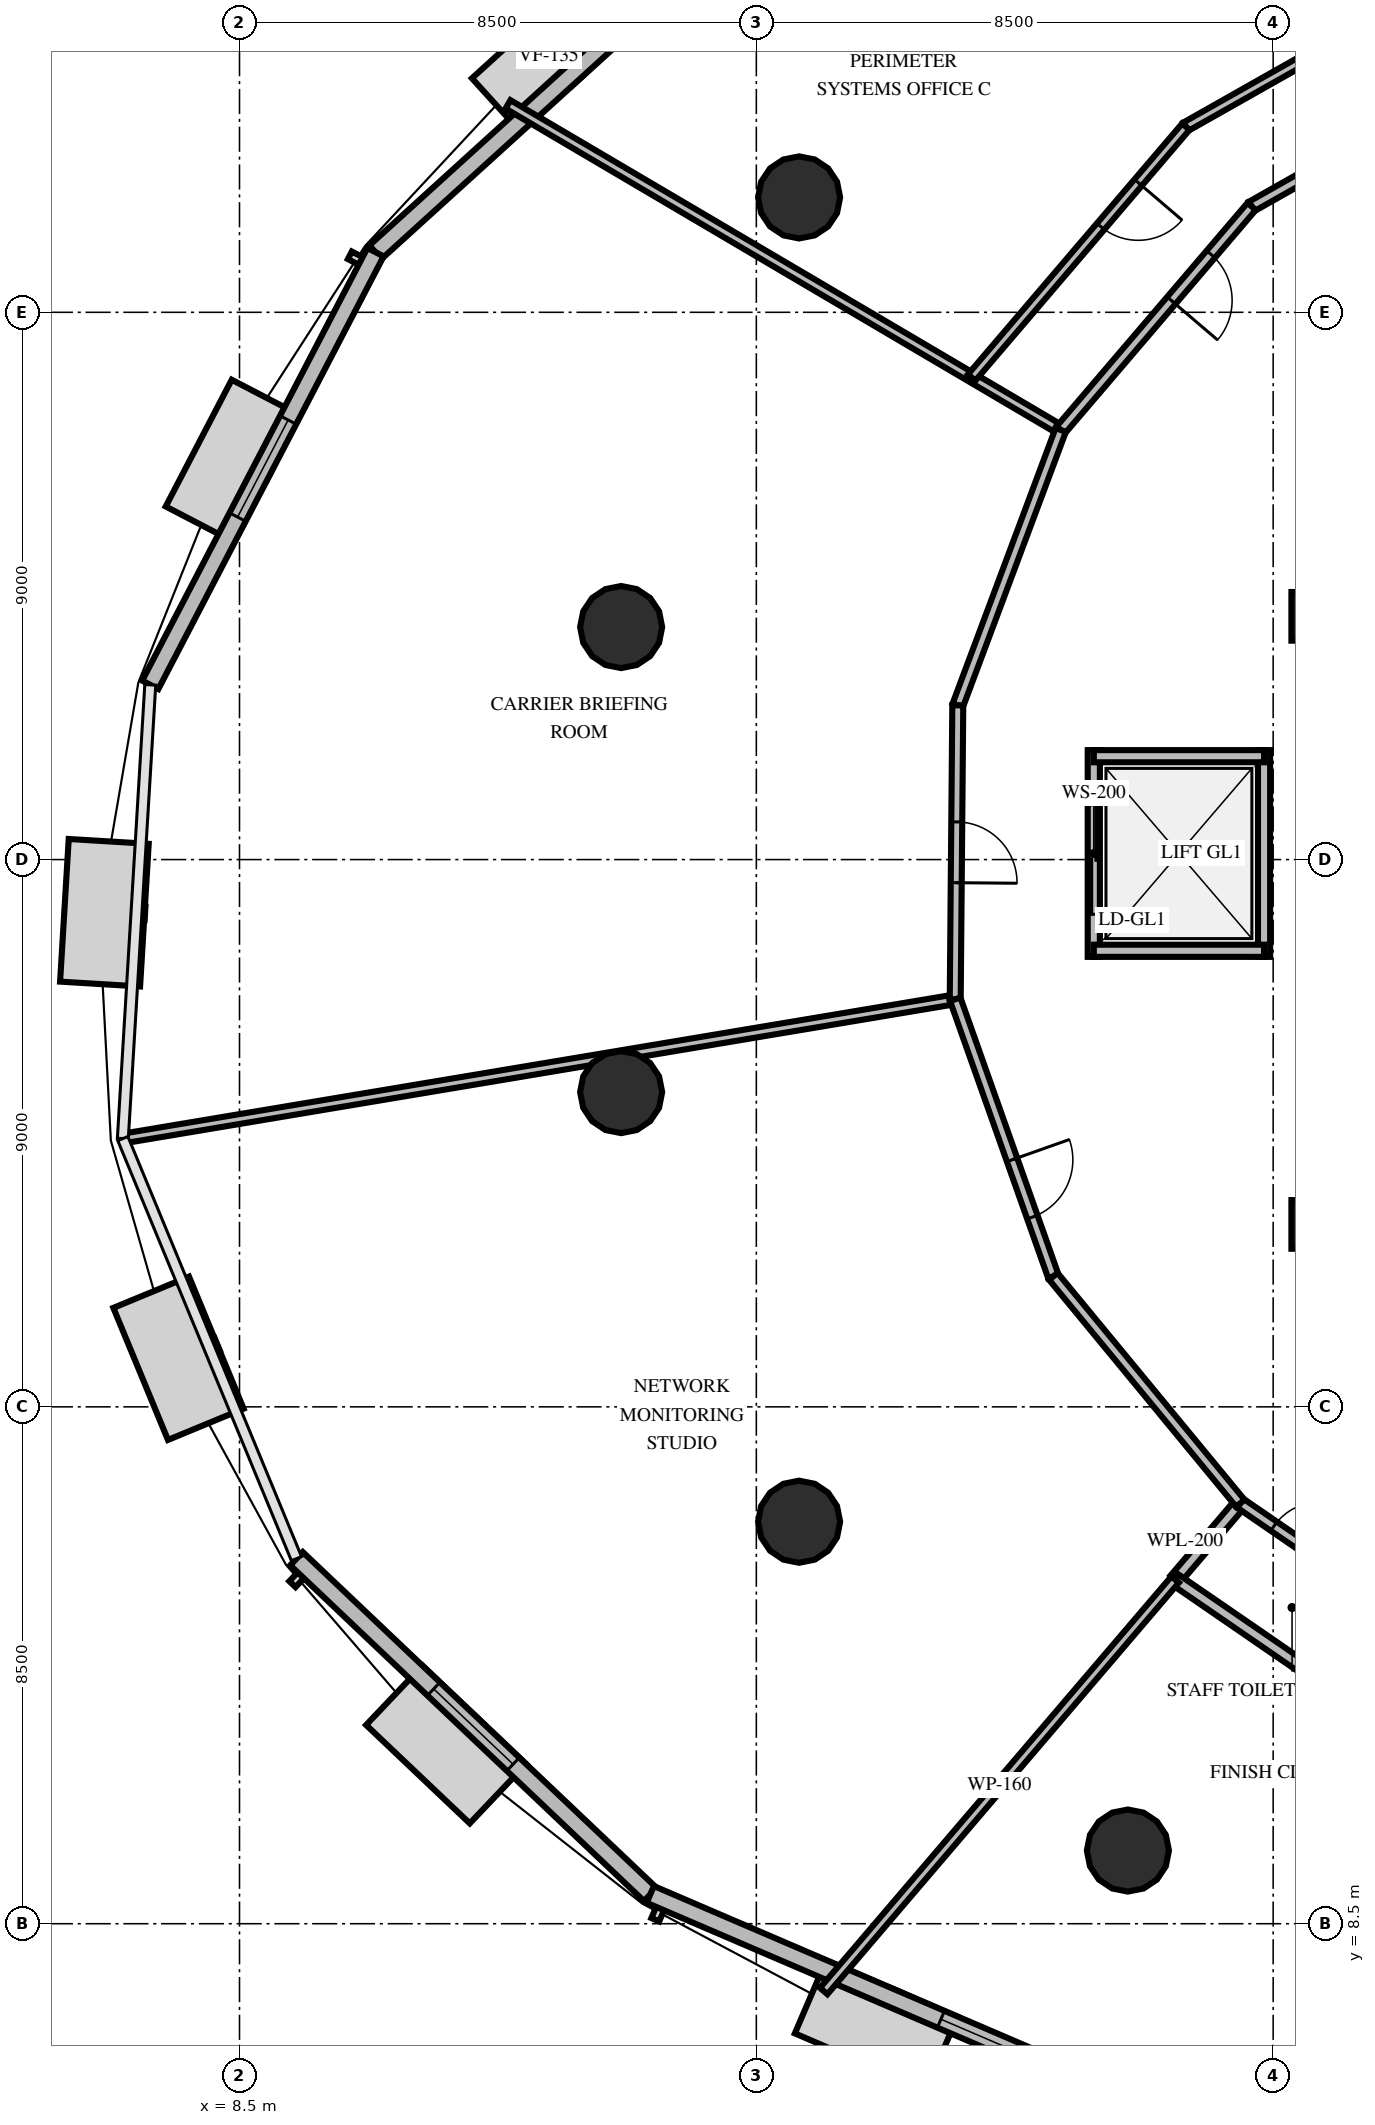
"""IFC4 building model, lengths in metres.
Left out: names, types, materials, properties, quantities, classifications, styles, units other than length and angle.
Written with IfcOpenShell. Run it as: python <this file> out.ifc"""

import sys

from ifc_helpers import new_model, si_unit, direction, frame, frame_2d, origin, origin_2d, place, context, subcontext, project, spatial, rectangle, circle, extrude, element, fill, save


model = new_model("IFC4")
c1 = context("Model", 3, precision=1e-05, world=origin(), true_north=direction((0.0, 1.0)))
c2 = subcontext(c1, "Body", "Model", "MODEL_VIEW")
j1 = project(units=[si_unit("LENGTHUNIT", "METRE"), si_unit("PLANEANGLEUNIT", "RADIAN")], contexts=[c1])
p1 = place(None, origin())
s1 = spatial("IfcSite", under=j1, at=p1, CompositionType="ELEMENT")
p2 = place(p1, origin())
s2 = spatial("IfcBuilding", under=s1, at=p2, CompositionType="ELEMENT")
p3 = place(p2, frame((0.0, 0.0, 72.0)))
s3 = spatial("IfcBuildingStorey", under=s2, at=p3, CompositionType="ELEMENT", Elevation=72.0)
for number, where, z_axis, x_axis in (
    (1, (26.2, 20.0, 0.0), (0.0, 0.0, 1.0), (1.0, 0.0, 0.0)),
    (2, (26.2, 30.0, 0.0), (0.0, 0.0, 1.0), (1.0, 0.0, 0.0)),
):
    element("IfcColumn", number, at=place(p3, frame(where, z_axis=z_axis, x_axis=x_axis)), inside=s3, PredefinedType="PILASTER", context=c2, shape_type="SweptSolid", body=[
        extrude(rectangle(XDim=0.8, YDim=0.8, at=origin_2d()), origin(), (0.0, 0.0, 1.0), 4.2),
    ])
for number, where, z_axis, x_axis in (
    (3, (17.703, 36.889, 0.0), (0.0, 0.0, 1.0), (1.0, 0.0, 0.0)),
    (4, (14.777, 29.824, 0.0), (0.0, 0.0, 1.0), (1.0, 0.0, 0.0)),
    (5, (14.777, 22.176, 0.0), (0.0, 0.0, 1.0), (1.0, 0.0, 0.0)),
    (6, (17.703, 15.111, 0.0), (0.0, 0.0, 1.0), (1.0, 0.0, 0.0)),
    (7, (23.111, 9.703, 0.0), (0.0, 0.0, 1.0), (1.0, 0.0, 0.0)),
):
    element("IfcColumn", number, at=place(p3, frame(where, z_axis=z_axis, x_axis=x_axis)), inside=s3, PredefinedType="COLUMN", context=c2, shape_type="SweptSolid", body=[
        extrude(circle(Radius=0.675, at=origin_2d()), origin(), (0.0, 0.0, 1.0), 4.2),
    ])
p4 = place(p3, frame((17.246, 41.899, 0.0), z_axis=(0.0, 0.0, 1.0), x_axis=(-0.74036835803, -0.672201379371, 0.0)))
e8 = element("IfcWall", 8, at=p4, inside=s3, PredefinedType="SOLIDWALL", context=c2, shape_type="SweptSolid", body=[
    extrude(rectangle(XDim=8.793, YDim=0.3, at=frame_2d((4.396, 0.0))), origin(), (0.0, 0.0, 1.0), 3.0),
])
p5 = place(p4, frame((1.79, 0.0, 0.8)))
e9 = element("IfcOpeningElement", 9, at=p5, cuts=e8, PredefinedType="OPENING", context=c2, shape_type="SweptSolid", body=[
    extrude(rectangle(XDim=1.8, YDim=1.95, at=frame_2d((0.9, 0.975))), frame((0.0, 0.16, 0.0), z_axis=(0.0, -1.0, 0.0), x_axis=(1.0, 0.0, 0.0)), (0.0, 0.0, 1.0), 0.32),
])
p6 = place(p3, frame((10.736, 35.989, 0.0), z_axis=(0.0, 0.0, 1.0), x_axis=(-0.461738888068, -0.887015895712, 0.0)))
e10 = element("IfcWall", 10, at=p6, inside=s3, PredefinedType="SOLIDWALL", context=c2, shape_type="SweptSolid", body=[
    extrude(rectangle(XDim=8.021, YDim=0.3, at=frame_2d((4.011, 0.0))), origin(), (0.0, 0.0, 1.0), 3.0),
])
p7 = place(p6, frame((3.111, 0.0, 0.8)))
e11 = element("IfcOpeningElement", 11, at=p7, cuts=e10, PredefinedType="OPENING", context=c2, shape_type="SweptSolid", body=[
    extrude(rectangle(XDim=1.8, YDim=1.95, at=frame_2d((0.9, 0.975))), frame((0.0, 0.16, 0.0), z_axis=(0.0, -1.0, 0.0), x_axis=(1.0, 0.0, 0.0)), (0.0, 0.0, 1.0), 0.32),
])
p8 = place(p3, frame((9.437, 14.503, 0.0), z_axis=(0.0, 0.0, 1.0), x_axis=(0.725354197524, -0.688375833491, 0.0)))
e12 = element("IfcWall", 12, at=p8, inside=s3, PredefinedType="SOLIDWALL", context=c2, shape_type="SweptSolid", body=[
    extrude(rectangle(XDim=8.022, YDim=0.3, at=frame_2d((4.011, 0.0))), origin(), (0.0, 0.0, 1.0), 3.0),
])
p9 = place(p8, frame((3.111, 0.0, 0.8)))
e13 = element("IfcOpeningElement", 13, at=p9, cuts=e12, PredefinedType="OPENING", context=c2, shape_type="SweptSolid", body=[
    extrude(rectangle(XDim=1.8, YDim=1.95, at=frame_2d((0.9, 0.975))), frame((0.0, 0.16, 0.0), z_axis=(0.0, -1.0, 0.0), x_axis=(1.0, 0.0, 0.0)), (0.0, 0.0, 1.0), 0.32),
])
p10 = place(p3, frame((15.256, 8.981, 0.0), z_axis=(0.0, 0.0, 1.0), x_axis=(0.918880561622, -0.394535820267, 0.0)))
e14 = element("IfcWall", 14, at=p10, inside=s3, PredefinedType="SOLIDWALL", context=c2, shape_type="SweptSolid", body=[
    extrude(rectangle(XDim=8.792, YDim=0.3, at=frame_2d((4.396, 0.0))), origin(), (0.0, 0.0, 1.0), 3.0),
])
p11 = place(p10, frame((5.202, 0.0, 0.8)))
e15 = element("IfcOpeningElement", 15, at=p11, cuts=e14, PredefinedType="OPENING", context=c2, shape_type="SweptSolid", body=[
    extrude(rectangle(XDim=1.8, YDim=1.95, at=frame_2d((0.9, 0.975))), frame((0.0, 0.16, 0.0), z_axis=(0.0, -1.0, 0.0), x_axis=(1.0, 0.0, 0.0)), (0.0, 0.0, 1.0), 0.32),
])
p12 = place(p3, frame((22.55, 24.4, 0.0), z_axis=(0.0, 0.0, 1.0), x_axis=(0.0, 1.0, 0.0)))
e16 = element("IfcWall", 16, at=p12, inside=s3, PredefinedType="SOLIDWALL", context=c2, shape_type="SweptSolid", body=[
    extrude(rectangle(XDim=3.4, YDim=0.2, at=frame_2d((1.7, 0.0))), origin(), (0.0, 0.0, 1.0), 3.0),
])
p13 = place(p12, frame((0.7, 0.0, 0.0)))
e17 = element("IfcOpeningElement", 17, at=p13, cuts=e16, PredefinedType="OPENING", context=c2, shape_type="SweptSolid", body=[
    extrude(rectangle(XDim=1.8, YDim=2.4, at=frame_2d((0.9, 1.2))), frame((0.0, 0.11, 0.0), z_axis=(0.0, -1.0, 0.0), x_axis=(1.0, 0.0, 0.0)), (0.0, 0.0, 1.0), 0.22),
])
p14 = place(p3, frame((25.35, 24.4, 0.0), z_axis=(0.0, 0.0, 1.0), x_axis=(0.0, 1.0, 0.0)))
e18 = element("IfcWall", 18, at=p14, inside=s3, PredefinedType="SOLIDWALL", context=c2, shape_type="SweptSolid", body=[
    extrude(rectangle(XDim=3.4, YDim=0.2, at=frame_2d((1.7, 0.0))), origin(), (0.0, 0.0, 1.0), 3.0),
])
for number, where, z_axis, x_axis in (
    (19, (22.55, 24.5, 0.0), (0.0, 0.0, 1.0), (1.0, 0.0, 0.0)),
    (20, (22.55, 27.7, 0.0), (0.0, 0.0, 1.0), (1.0, 0.0, 0.0)),
):
    element("IfcWall", number, at=place(p3, frame(where, z_axis=z_axis, x_axis=x_axis)), inside=s3, PredefinedType="SOLIDWALL", context=c2, shape_type="SweptSolid", body=[
        extrude(rectangle(XDim=2.8, YDim=0.2, at=frame_2d((1.4, 0.0))), origin(), (0.0, 0.0, 1.0), 3.0),
    ])
p15 = place(p3, frame((24.96, 15.415, 0.0), z_axis=(0.0, 0.0, 1.0), x_axis=(-0.649437726275, -0.760414781346, 0.0)))
e21 = element("IfcWall", 21, at=p15, inside=s3, PredefinedType="PLUMBINGWALL", context=c2, shape_type="SweptSolid", body=[
    extrude(rectangle(XDim=1.65, YDim=0.2, at=frame_2d((0.825, 0.0))), origin(), (0.0, 0.0, 1.0), 3.0),
])
p16 = place(p3, frame((23.888, 14.16, 0.0), z_axis=(0.0, 0.0, 1.0), x_axis=(0.82413164696, -0.566398294912, 0.0)))
e22 = element("IfcWall", 22, at=p16, inside=s3, PredefinedType="PLUMBINGWALL", context=c2, shape_type="SweptSolid", body=[
    extrude(rectangle(XDim=3.255, YDim=0.2, at=frame_2d((1.627, 0.0))), origin(), (0.0, 0.0, 1.0), 3.0),
])
p17 = place(p3, frame((24.96, 15.415, 0.0), z_axis=(0.0, 0.0, 1.0), x_axis=(0.824132488169, -0.566397070918, 0.0)))
e23 = element("IfcWall", 23, at=p17, inside=s3, PredefinedType="PARTITIONING", context=c2, shape_type="SweptSolid", body=[
    extrude(rectangle(XDim=2.91, YDim=0.18, at=frame_2d((1.455, 0.0))), origin(), (0.0, 0.0, 1.0), 3.0),
])
p18 = place(p17, frame((0.669, 0.0, 0.0)))
e24 = element("IfcOpeningElement", 24, at=p18, cuts=e23, PredefinedType="OPENING", context=c2, shape_type="SweptSolid", body=[
    extrude(rectangle(XDim=0.92, YDim=2.1, at=frame_2d((0.46, 1.05))), frame((0.0, 0.1, 0.0), z_axis=(0.0, -1.0, 0.0), x_axis=(1.0, 0.0, 0.0)), (0.0, 0.0, 1.0), 0.2),
])
p19 = place(p3, frame((23.888, 14.16, 0.0), z_axis=(0.0, 0.0, 1.0), x_axis=(-0.649448513344, -0.760405568441, 0.0)))
e25 = element("IfcWall", 25, at=p19, inside=s3, PredefinedType="PARTITIONING", context=c2, shape_type="SweptSolid", body=[
    extrude(rectangle(XDim=8.9, YDim=0.16, at=frame_2d((4.45, 0.0))), origin(), (0.0, 0.0, 1.0), 3.0),
])
p20 = place(p3, frame((22.006, 33.065, 0.0), z_axis=(0.0, 0.0, 1.0), x_axis=(-0.8616300832, 0.507536796424, 0.0)))
e26 = element("IfcWall", 26, at=p20, inside=s3, PredefinedType="PARTITIONING", context=c2, shape_type="SweptSolid", body=[
    extrude(rectangle(XDim=10.551, YDim=0.16, at=frame_2d((5.275, 0.0))), origin(), (0.0, 0.0, 1.0), 3.0),
])
p21 = place(p3, frame((29.354, 39.122, 0.0), z_axis=(0.0, 0.0, 1.0), x_axis=(-0.870357726762, -0.492419970621, 0.0)))
e27 = element("IfcWall", 27, at=p21, inside=s3, PredefinedType="PARTITIONING", context=c2, shape_type="SweptSolid", body=[
    extrude(rectangle(XDim=4.834, YDim=0.18, at=frame_2d((2.417, 0.0))), origin(), (0.0, 0.0, 1.0), 3.0),
])
p22 = place(p3, frame((25.146, 36.741, 0.0), z_axis=(0.0, 0.0, 1.0), x_axis=(-0.649451176298, -0.760403294052, 0.0)))
e28 = element("IfcWall", 28, at=p22, inside=s3, PredefinedType="PARTITIONING", context=c2, shape_type="SweptSolid", body=[
    extrude(rectangle(XDim=4.834, YDim=0.18, at=frame_2d((2.417, 0.0))), origin(), (0.0, 0.0, 1.0), 3.0),
])
p23 = place(p22, frame((1.034, 0.0, 0.0)))
e29 = element("IfcOpeningElement", 29, at=p23, cuts=e28, PredefinedType="OPENING", context=c2, shape_type="SweptSolid", body=[
    extrude(rectangle(XDim=1.0, YDim=2.15, at=frame_2d((0.5, 1.075))), frame((0.0, 0.1, 0.0), z_axis=(0.0, -1.0, 0.0), x_axis=(1.0, 0.0, 0.0)), (0.0, 0.0, 1.0), 0.2),
])
p24 = place(p3, frame((28.786, 40.724, 0.0), z_axis=(0.0, 0.0, 1.0), x_axis=(-0.870345661177, -0.492441296065, 0.0)))
e30 = element("IfcWall", 30, at=p24, inside=s3, PredefinedType="PARTITIONING", context=c2, shape_type="SweptSolid", body=[
    extrude(rectangle(XDim=5.425, YDim=0.16, at=frame_2d((2.712, 0.0))), origin(), (0.0, 0.0, 1.0), 3.0),
])
p25 = place(p3, frame((24.064, 38.053, 0.0), z_axis=(0.0, 0.0, 1.0), x_axis=(-0.649433806755, -0.760418128824, 0.0)))
e31 = element("IfcWall", 31, at=p25, inside=s3, PredefinedType="PARTITIONING", context=c2, shape_type="SweptSolid", body=[
    extrude(rectangle(XDim=5.425, YDim=0.16, at=frame_2d((2.712, 0.0))), origin(), (0.0, 0.0, 1.0), 3.0),
])
p26 = place(p25, frame((1.209, 0.0, 0.0)))
e32 = element("IfcOpeningElement", 32, at=p26, cuts=e31, PredefinedType="OPENING", context=c2, shape_type="SweptSolid", body=[
    extrude(rectangle(XDim=0.95, YDim=2.15, at=frame_2d((0.475, 1.075))), frame((0.0, 0.09, 0.0), z_axis=(0.0, -1.0, 0.0), x_axis=(1.0, 0.0, 0.0)), (0.0, 0.0, 1.0), 0.18),
])
p27 = place(p3, frame((20.271, 23.702, 0.0), z_axis=(0.0, 0.0, 1.0), x_axis=(-0.986286752886, -0.165040725524, 0.0)))
e33 = element("IfcWall", 33, at=p27, inside=s3, PredefinedType="PARTITIONING", context=c2, shape_type="SweptSolid", body=[
    extrude(rectangle(XDim=13.88, YDim=0.16, at=frame_2d((6.94, 0.0))), origin(), (0.0, 0.0, 1.0), 3.0),
])
p28 = place(p3, frame((22.006, 33.065, 0.0), z_axis=(0.0, 0.0, 1.0), x_axis=(-0.350215664948, -0.936669092062, 0.0)))
e34 = element("IfcWall", 34, at=p28, inside=s3, PredefinedType="PARTITIONING", context=c2, shape_type="SweptSolid", body=[
    extrude(rectangle(XDim=4.834, YDim=0.18, at=frame_2d((2.417, 0.0))), origin(), (0.0, 0.0, 1.0), 3.0),
])
p29 = place(p3, frame((20.313, 28.537, 0.0), z_axis=(0.0, 0.0, 1.0), x_axis=(-0.008686102284, -0.999962275102, 0.0)))
e35 = element("IfcWall", 35, at=p29, inside=s3, PredefinedType="PARTITIONING", context=c2, shape_type="SweptSolid", body=[
    extrude(rectangle(XDim=4.834, YDim=0.18, at=frame_2d((2.417, 0.0))), origin(), (0.0, 0.0, 1.0), 3.0),
])
p30 = place(p29, frame((1.917, 0.0, 0.0)))
e36 = element("IfcOpeningElement", 36, at=p30, cuts=e35, PredefinedType="OPENING", context=c2, shape_type="SweptSolid", body=[
    extrude(rectangle(XDim=1.0, YDim=2.15, at=frame_2d((0.5, 1.075))), frame((0.0, 0.1, 0.0), z_axis=(0.0, -1.0, 0.0), x_axis=(1.0, 0.0, 0.0)), (0.0, 0.0, 1.0), 0.2),
])
p31 = place(p3, frame((20.271, 23.702, 0.0), z_axis=(0.0, 0.0, 1.0), x_axis=(0.333778894191, -0.942651393566, 0.0)))
e37 = element("IfcWall", 37, at=p31, inside=s3, PredefinedType="PARTITIONING", context=c2, shape_type="SweptSolid", body=[
    extrude(rectangle(XDim=4.834, YDim=0.18, at=frame_2d((2.417, 0.0))), origin(), (0.0, 0.0, 1.0), 3.0),
])
p32 = place(p31, frame((2.801, 0.0, 0.0)))
e38 = element("IfcOpeningElement", 38, at=p32, cuts=e37, PredefinedType="OPENING", context=c2, shape_type="SweptSolid", body=[
    extrude(rectangle(XDim=1.0, YDim=2.15, at=frame_2d((0.5, 1.075))), frame((0.0, 0.1, 0.0), z_axis=(0.0, -1.0, 0.0), x_axis=(1.0, 0.0, 0.0)), (0.0, 0.0, 1.0), 0.2),
])
p33 = place(p3, frame((21.885, 19.146, 0.0), z_axis=(0.0, 0.0, 1.0), x_axis=(0.636082430418, -0.771621112797, 0.0)))
e39 = element("IfcWall", 39, at=p33, inside=s3, PredefinedType="PARTITIONING", context=c2, shape_type="SweptSolid", body=[
    extrude(rectangle(XDim=4.834, YDim=0.18, at=frame_2d((2.417, 0.0))), origin(), (0.0, 0.0, 1.0), 3.0),
])
p34 = place(p7, origin())
e40 = element("IfcWindow", 40, at=p34, inside=s3, PartitioningType="SINGLE_PANEL", PredefinedType="WINDOW", context=c2, shape_type="SweptSolid", body=[
    extrude(rectangle(XDim=1.8, YDim=1.95, at=frame_2d((0.9, 0.975))), frame((0.0, 0.03, 0.0), z_axis=(0.0, -1.0, 0.0), x_axis=(1.0, 0.0, 0.0)), (0.0, 0.0, 1.0), 0.06),
])
fill(e11, e40)
p35 = place(p9, origin())
e41 = element("IfcWindow", 41, at=p35, inside=s3, PartitioningType="SINGLE_PANEL", PredefinedType="WINDOW", context=c2, shape_type="SweptSolid", body=[
    extrude(rectangle(XDim=1.8, YDim=1.95, at=frame_2d((0.9, 0.975))), frame((0.0, 0.03, 0.0), z_axis=(0.0, -1.0, 0.0), x_axis=(1.0, 0.0, 0.0)), (0.0, 0.0, 1.0), 0.06),
])
fill(e13, e41)
p36 = place(p11, origin())
e42 = element("IfcWindow", 42, at=p36, inside=s3, PartitioningType="SINGLE_PANEL", PredefinedType="WINDOW", context=c2, shape_type="SweptSolid", body=[
    extrude(rectangle(XDim=1.8, YDim=1.95, at=frame_2d((0.9, 0.975))), frame((0.0, 0.03, 0.0), z_axis=(0.0, -1.0, 0.0), x_axis=(1.0, 0.0, 0.0)), (0.0, 0.0, 1.0), 0.06),
])
fill(e15, e42)
p37 = place(p13, origin())
e43 = element("IfcDoor", 43, at=p37, inside=s3, OperationType="DOUBLE_DOOR_SLIDING", PredefinedType="USERDEFINED", context=c2, shape_type="SweptSolid", body=[
    extrude(rectangle(XDim=1.8, YDim=2.4, at=frame_2d((0.9, 1.2))), frame((0.0, 0.025, 0.0), z_axis=(0.0, -1.0, 0.0), x_axis=(1.0, 0.0, 0.0)), (0.0, 0.0, 1.0), 0.05),
])
fill(e17, e43)
p38 = place(p18, origin())
e44 = element("IfcDoor", 44, at=p38, inside=s3, OperationType="SINGLE_SWING_RIGHT", PredefinedType="DOOR", context=c2, shape_type="SweptSolid", body=[
    extrude(rectangle(XDim=0.92, YDim=2.1, at=frame_2d((0.46, 1.05))), frame((0.0, 0.025, 0.0), z_axis=(0.0, -1.0, 0.0), x_axis=(1.0, 0.0, 0.0)), (0.0, 0.0, 1.0), 0.05),
])
fill(e24, e44)
p39 = place(p23, origin())
e45 = element("IfcDoor", 45, at=p39, inside=s3, OperationType="SINGLE_SWING_RIGHT", PredefinedType="DOOR", context=c2, shape_type="SweptSolid", body=[
    extrude(rectangle(XDim=1.0, YDim=2.15, at=frame_2d((0.5, 1.075))), frame((0.0, 0.025, 0.0), z_axis=(0.0, -1.0, 0.0), x_axis=(1.0, 0.0, 0.0)), (0.0, 0.0, 1.0), 0.05),
])
fill(e29, e45)
p40 = place(p26, origin())
e46 = element("IfcDoor", 46, at=p40, inside=s3, OperationType="SINGLE_SWING_LEFT", PredefinedType="DOOR", context=c2, shape_type="SweptSolid", body=[
    extrude(rectangle(XDim=0.95, YDim=2.15, at=frame_2d((0.475, 1.075))), frame((0.0, 0.025, 0.0), z_axis=(0.0, -1.0, 0.0), x_axis=(1.0, 0.0, 0.0)), (0.0, 0.0, 1.0), 0.05),
])
fill(e32, e46)
p41 = place(p30, origin())
e47 = element("IfcDoor", 47, at=p41, inside=s3, OperationType="SINGLE_SWING_RIGHT", PredefinedType="DOOR", context=c2, shape_type="SweptSolid", body=[
    extrude(rectangle(XDim=1.0, YDim=2.15, at=frame_2d((0.5, 1.075))), frame((0.0, 0.025, 0.0), z_axis=(0.0, -1.0, 0.0), x_axis=(1.0, 0.0, 0.0)), (0.0, 0.0, 1.0), 0.05),
])
fill(e36, e47)
p42 = place(p32, origin())
e48 = element("IfcDoor", 48, at=p42, inside=s3, OperationType="SINGLE_SWING_LEFT", PredefinedType="DOOR", context=c2, shape_type="SweptSolid", body=[
    extrude(rectangle(XDim=1.0, YDim=2.15, at=frame_2d((0.5, 1.075))), frame((0.0, 0.025, 0.0), z_axis=(0.0, -1.0, 0.0), x_axis=(1.0, 0.0, 0.0)), (0.0, 0.0, 1.0), 0.05),
])
fill(e38, e48)
save(model, sys.argv[1])
